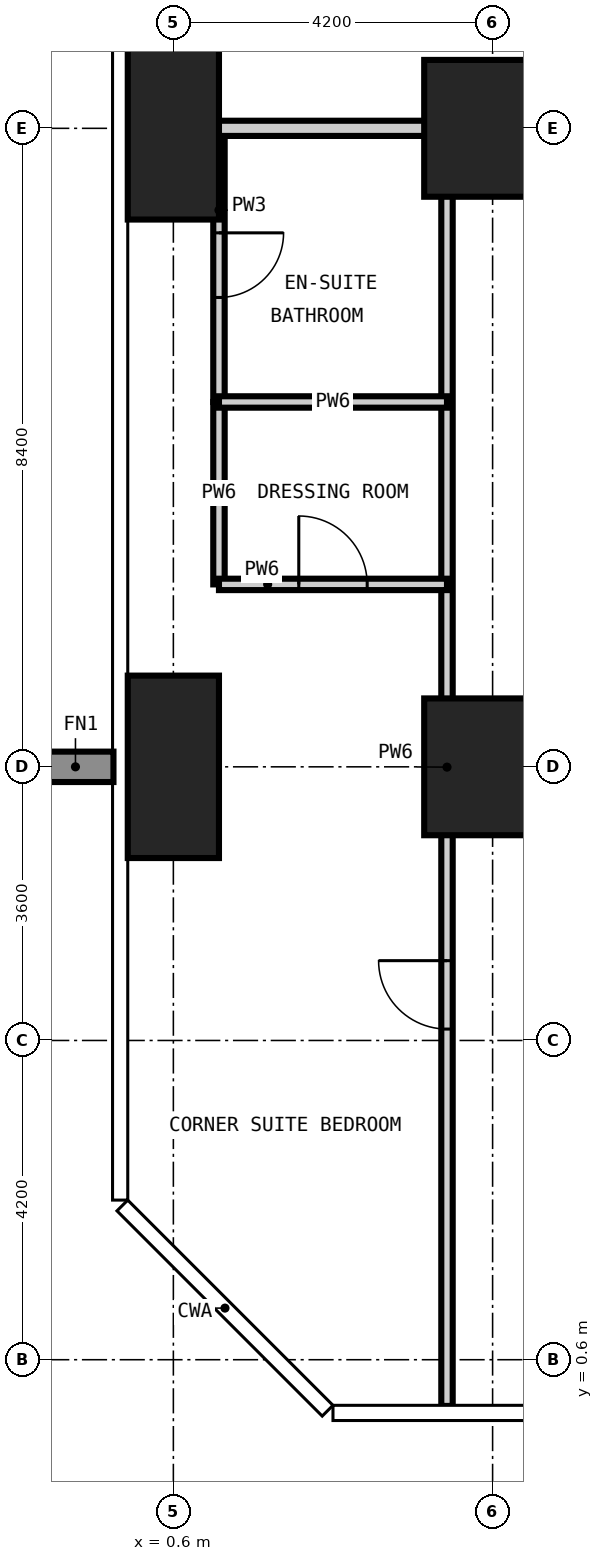
"""IFC4 building model, lengths in metres.
Left out: names, types, materials, properties, quantities, classifications, styles, units other than length and angle.
Written with IfcOpenShell. Run it as: python <this file> out.ifc"""

import sys

from ifc_helpers import new_model, si_unit, direction, frame, frame_2d, origin, origin_2d, place, context, subcontext, project, spatial, rectangle, extrude, element, fill, save


model = new_model("IFC4")
c1 = context("Model", 3, precision=1e-05, world=origin(), true_north=direction((0.0, 1.0)))
c2 = subcontext(c1, "Body", "Model", "MODEL_VIEW")
j1 = project(units=[si_unit("LENGTHUNIT", "METRE"), si_unit("PLANEANGLEUNIT", "RADIAN")], contexts=[c1])
p1 = place(None, origin())
s1 = spatial("IfcSite", under=j1, at=p1, CompositionType="ELEMENT")
p2 = place(p1, origin())
s2 = spatial("IfcBuilding", under=s1, at=p2, CompositionType="ELEMENT")
p3 = place(p2, frame((0.0, 0.0, 34.2)))
s3 = spatial("IfcBuildingStorey", under=s2, at=p3, CompositionType="ELEMENT", Elevation=34.2)
for number, where, z_axis, x_axis in (
    (1, (0.6, 8.4, -0.35), (0.0, 0.0, 1.0), (1.0, 0.0, 0.0)),
    (2, (0.6, 16.8, -0.35), (0.0, 0.0, 1.0), (1.0, 0.0, 0.0)),
):
    element("IfcColumn", number, at=place(p3, frame(where, z_axis=z_axis, x_axis=x_axis)), inside=s3, PredefinedType="COLUMN", context=c2, shape_type="SweptSolid", body=[
        extrude(rectangle(XDim=1.2, YDim=2.4, at=origin_2d()), origin(), (0.0, 0.0, 1.0), 3.6),
    ])
for number, where, z_axis, x_axis in (
    (3, (4.8, 8.4, -0.35), (0.0, 0.0, 1.0), (1.0, 0.0, 0.0)),
    (4, (4.8, 16.8, -0.35), (0.0, 0.0, 1.0), (1.0, 0.0, 0.0)),
):
    element("IfcColumn", number, at=place(p3, frame(where, z_axis=z_axis, x_axis=x_axis)), inside=s3, PredefinedType="COLUMN", context=c2, shape_type="SweptSolid", body=[
        extrude(rectangle(XDim=1.8, YDim=1.8, at=origin_2d()), origin(), (0.0, 0.0, 1.0), 3.6),
    ])
p4 = place(p3, frame((1.2, 13.2, 0.0), z_axis=(0.0, 0.0, 1.0), x_axis=(0.0, 1.0, 0.0)))
e5 = element("IfcWall", 5, at=p4, inside=s3, PredefinedType="PARTITIONING", context=c2, shape_type="SweptSolid", body=[
    extrude(rectangle(XDim=3.6, YDim=0.15, at=frame_2d((1.8, 0.0))), origin(), (0.0, 0.0, 1.0), 3.25),
])
p5 = place(p4, frame((1.375, 0.0, 0.0)))
e6 = element("IfcOpeningElement", 6, at=p5, cuts=e5, PredefinedType="OPENING", context=c2, shape_type="SweptSolid", body=[
    extrude(rectangle(XDim=0.85, YDim=2.1, at=frame_2d((0.425, 1.05))), frame((0.0, 0.085, 0.0), z_axis=(0.0, -1.0, 0.0), x_axis=(1.0, 0.0, 0.0)), (0.0, 0.0, 1.0), 0.17),
])
p6 = place(p3, frame((-0.008, 16.8, 0.0), z_axis=(0.0, 0.0, 1.0), x_axis=(1.0, 0.0, 0.0)))
e7 = element("IfcWall", 7, at=p6, inside=s3, PredefinedType="PARTITIONING", context=c2, shape_type="SweptSolid", body=[
    extrude(rectangle(XDim=13.258, YDim=0.2, at=frame_2d((6.629, 0.0))), origin(), (0.0, 0.0, 1.0), 3.25),
])
p7 = place(p3, frame((1.2, 10.8, 0.0), z_axis=(0.0, 0.0, 1.0), x_axis=(0.0, 1.0, 0.0)))
e8 = element("IfcWall", 8, at=p7, inside=s3, PredefinedType="PARTITIONING", context=c2, shape_type="SweptSolid", body=[
    extrude(rectangle(XDim=2.4, YDim=0.15, at=frame_2d((1.2, 0.0))), origin(), (0.0, 0.0, 1.0), 3.25),
])
p8 = place(p3, frame((4.2, -0.008, 0.0), z_axis=(0.0, 0.0, 1.0), x_axis=(0.0, 1.0, 0.0)))
e9 = element("IfcWall", 9, at=p8, inside=s3, PredefinedType="PARTITIONING", context=c2, shape_type="SweptSolid", body=[
    extrude(rectangle(XDim=16.808, YDim=0.15, at=frame_2d((8.404, 0.0))), origin(), (0.0, 0.0, 1.0), 3.25),
])
p9 = place(p8, frame((4.958, 0.0, 0.0)))
e10 = element("IfcOpeningElement", 10, at=p9, cuts=e9, PredefinedType="OPENING", context=c2, shape_type="SweptSolid", body=[
    extrude(rectangle(XDim=0.9, YDim=2.1, at=frame_2d((0.45, 1.05))), frame((0.0, 0.085, 0.0), z_axis=(0.0, -1.0, 0.0), x_axis=(1.0, 0.0, 0.0)), (0.0, 0.0, 1.0), 0.17),
])
p10 = place(p3, frame((1.2, 10.8, 0.0), z_axis=(0.0, 0.0, 1.0), x_axis=(1.0, 0.0, 0.0)))
e11 = element("IfcWall", 11, at=p10, inside=s3, PredefinedType="PARTITIONING", context=c2, shape_type="SweptSolid", body=[
    extrude(rectangle(XDim=3.0, YDim=0.15, at=frame_2d((1.5, 0.0))), origin(), (0.0, 0.0, 1.0), 3.25),
])
p11 = place(p10, frame((1.05, 0.0, 0.0)))
e12 = element("IfcOpeningElement", 12, at=p11, cuts=e11, PredefinedType="OPENING", context=c2, shape_type="SweptSolid", body=[
    extrude(rectangle(XDim=0.9, YDim=2.1, at=frame_2d((0.45, 1.05))), frame((0.0, 0.085, 0.0), z_axis=(0.0, -1.0, 0.0), x_axis=(1.0, 0.0, 0.0)), (0.0, 0.0, 1.0), 0.17),
])
p12 = place(p3, frame((1.2, 13.2, 0.0), z_axis=(0.0, 0.0, 1.0), x_axis=(1.0, 0.0, 0.0)))
e13 = element("IfcWall", 13, at=p12, inside=s3, PredefinedType="PARTITIONING", context=c2, shape_type="SweptSolid", body=[
    extrude(rectangle(XDim=3.0, YDim=0.15, at=frame_2d((1.5, 0.0))), origin(), (0.0, 0.0, 1.0), 3.25),
])
p13 = place(p9, origin())
e14 = element("IfcDoor", 14, at=p13, inside=s3, OperationType="SINGLE_SWING_RIGHT", PredefinedType="DOOR", context=c2, shape_type="SweptSolid", body=[
    extrude(rectangle(XDim=0.9, YDim=2.1, at=frame_2d((0.45, 1.05))), frame((0.0, 0.025, 0.0), z_axis=(0.0, -1.0, 0.0), x_axis=(1.0, 0.0, 0.0)), (0.0, 0.0, 1.0), 0.05),
])
fill(e10, e14)
p14 = place(p5, frame((0.85, 0.0, 0.0), z_axis=(0.0, 0.0, 1.0), x_axis=(-1.0, 0.0, 0.0)))
e15 = element("IfcDoor", 15, at=p14, inside=s3, OperationType="SINGLE_SWING_LEFT", PredefinedType="DOOR", context=c2, shape_type="SweptSolid", body=[
    extrude(rectangle(XDim=0.85, YDim=2.1, at=frame_2d((0.425, 1.05))), frame((0.0, 0.025, 0.0), z_axis=(0.0, -1.0, 0.0), x_axis=(1.0, 0.0, 0.0)), (0.0, 0.0, 1.0), 0.05),
])
fill(e6, e15)
p15 = place(p11, origin())
e16 = element("IfcDoor", 16, at=p15, inside=s3, OperationType="SINGLE_SWING_LEFT", PredefinedType="DOOR", context=c2, shape_type="SweptSolid", body=[
    extrude(rectangle(XDim=0.9, YDim=2.1, at=frame_2d((0.45, 1.05))), frame((0.0, 0.025, 0.0), z_axis=(0.0, -1.0, 0.0), x_axis=(1.0, 0.0, 0.0)), (0.0, 0.0, 1.0), 0.05),
])
fill(e12, e16)
save(model, sys.argv[1])
